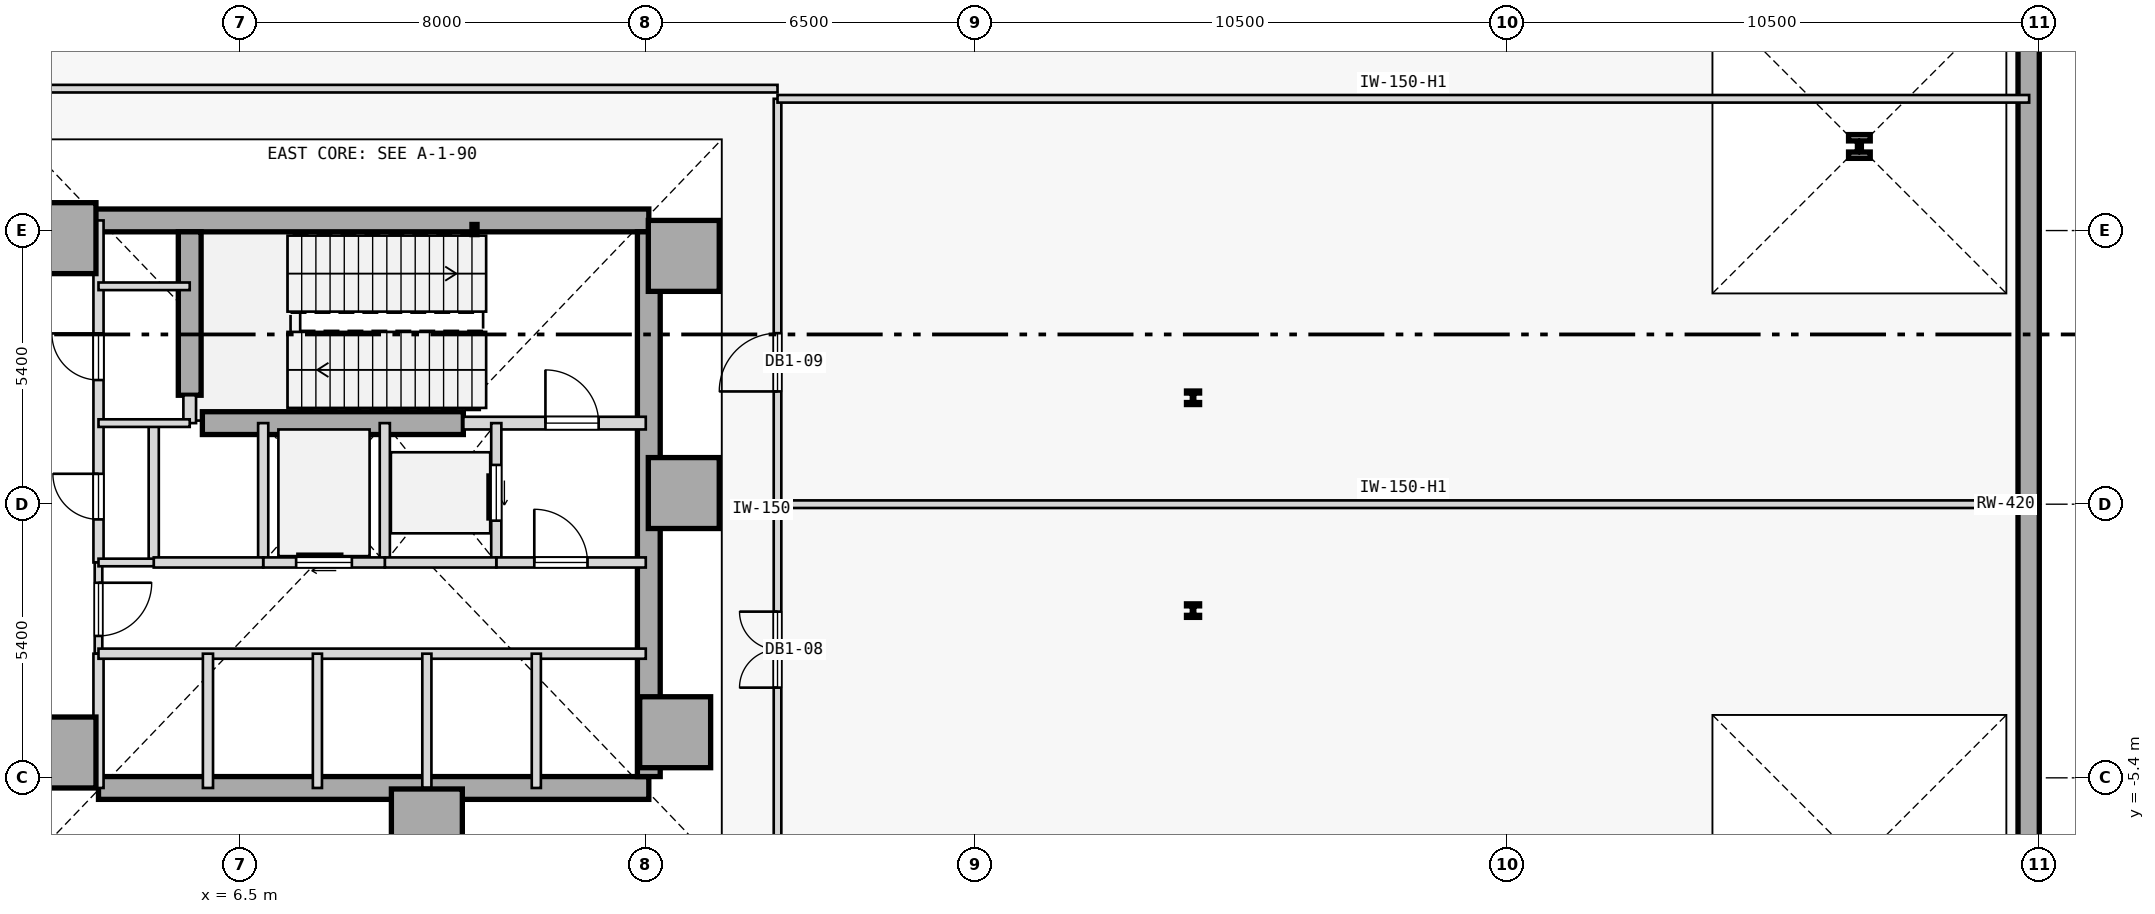
"""IFC4 building model, lengths in metres.
Left out: names, types, materials, properties, quantities, classifications, styles, units other than length and angle.
Written with IfcOpenShell. Run it as: python <this file> out.ifc"""

import sys

from ifc_helpers import new_model, si_unit, direction, frame, frame_2d, origin, origin_2d, place, context, subcontext, project, spatial, rectangle, hollow_rectangle, i_section, extrude, element, fill, save


model = new_model("IFC4")
c1 = context("Model", 3, precision=1e-05, world=origin(), true_north=direction((0.0, 1.0)))
c2 = subcontext(c1, "Body", "Model", "MODEL_VIEW")
j1 = project(units=[si_unit("LENGTHUNIT", "METRE"), si_unit("PLANEANGLEUNIT", "RADIAN")], contexts=[c1])
p1 = place(None, origin())
s1 = spatial("IfcSite", under=j1, at=p1, CompositionType="ELEMENT")
p2 = place(p1, origin())
s2 = spatial("IfcBuilding", under=s1, at=p2, CompositionType="ELEMENT")
p3 = place(p2, frame((0.0, 0.0, -5.0)))
s3 = spatial("IfcBuildingStorey", under=s2, at=p3, CompositionType="ELEMENT", Elevation=-5.0)
p4 = place(p3, frame((41.79, -27.55, 0.0), z_axis=(0.0, 0.0, 1.0), x_axis=(0.0, 1.0, 0.0)))
e1 = element("IfcWall", 1, at=p4, inside=s3, PredefinedType="SHEAR", context=c2, shape_type="SweptSolid", body=[
    extrude(rectangle(XDim=55.1, YDim=0.42, at=frame_2d((27.55, 0.0))), origin(), (0.0, 0.0, 1.0), 4.7),
])
for number, where, z_axis, x_axis in (
    (2, (15.25, 4.9, 0.0), (0.0, 0.0, 1.0), (1.0, 0.0, 0.0)),
    (3, (15.25, 0.22, 0.0), (0.0, 0.0, 1.0), (1.0, 0.0, 0.0)),
    (4, (15.08, -4.5, 0.0), (0.0, 0.0, 1.0), (1.0, 0.0, 0.0)),
    (5, (10.18, -6.32, 0.0), (0.0, 0.0, 1.0), (1.0, 0.0, 0.0)),
    (6, (2.95, -4.9, 0.0), (0.0, 0.0, 1.0), (1.0, 0.0, 0.0)),
    (7, (2.95, 5.25, 0.0), (0.0, 0.0, 1.0), (1.0, 0.0, 0.0)),
):
    element("IfcColumn", number, at=place(p3, frame(where, z_axis=z_axis, x_axis=x_axis)), inside=s3, PredefinedType="COLUMN", context=c2, shape_type="SweptSolid", body=[
        extrude(rectangle(XDim=1.4, YDim=1.4, at=origin_2d()), origin(), (0.0, 0.0, 1.0), 5.0),
    ])
p5 = place(p3, frame((3.15, 5.6, 0.0), z_axis=(0.0, 0.0, 1.0), x_axis=(1.0, 0.0, 0.0)))
e8 = element("IfcWall", 8, at=p5, inside=s3, PredefinedType="SHEAR", context=c2, shape_type="SweptSolid", body=[
    extrude(rectangle(XDim=11.41, YDim=0.45, at=frame_2d((5.705, 0.0))), origin(), (0.0, 0.0, 1.0), 4.7),
])
p6 = place(p3, frame((3.7, -5.6, 0.0), z_axis=(0.0, 0.0, 1.0), x_axis=(1.0, 0.0, 0.0)))
e9 = element("IfcWall", 9, at=p6, inside=s3, PredefinedType="SHEAR", context=c2, shape_type="SweptSolid", body=[
    extrude(rectangle(XDim=10.86, YDim=0.45, at=frame_2d((5.43, 0.0))), origin(), (0.0, 0.0, 1.0), 4.7),
])
p7 = place(p3, frame((14.56, -5.375, 0.0), z_axis=(0.0, 0.0, 1.0), x_axis=(0.0, 1.0, 0.0)))
e10 = element("IfcWall", 10, at=p7, inside=s3, PredefinedType="SHEAR", context=c2, shape_type="SweptSolid", body=[
    extrude(rectangle(XDim=10.75, YDim=0.45, at=frame_2d((5.375, 0.0))), origin(), (0.0, 0.0, 1.0), 4.7),
])
p8 = place(p3, frame((5.5, 2.15, 0.0), z_axis=(0.0, 0.0, 1.0), x_axis=(0.0, 1.0, 0.0)))
e11 = element("IfcWall", 11, at=p8, inside=s3, PredefinedType="SHEAR", context=c2, shape_type="SweptSolid", body=[
    extrude(rectangle(XDim=3.225, YDim=0.45, at=frame_2d((1.613, 0.0))), origin(), (0.0, 0.0, 1.0), 4.7),
])
p9 = place(p3, frame((5.75, 1.6, 0.0), z_axis=(0.0, 0.0, 1.0), x_axis=(1.0, 0.0, 0.0)))
e12 = element("IfcWall", 12, at=p9, inside=s3, PredefinedType="SHEAR", context=c2, shape_type="SweptSolid", body=[
    extrude(rectangle(XDim=5.15, YDim=0.45, at=frame_2d((2.575, 0.0))), origin(), (0.0, 0.0, 1.0), 4.7),
])
p10 = place(p3, frame((11.12, 5.42, 0.0), z_axis=(0.0, 0.0, 1.0), x_axis=(1.0, 0.0, 0.0)))
e13 = element("IfcColumn", 13, at=p10, inside=s3, PredefinedType="COLUMN", context=c2, shape_type="SweptSolid", body=[
    extrude(hollow_rectangle(XDim=0.1, YDim=0.2, WallThickness=0.008, at=origin_2d()), origin(), (0.0, 0.0, 1.0), 5.0),
])
p11 = place(p3, frame((38.45, 7.059, 0.0), z_axis=(0.0, 0.0, 1.0), x_axis=(1.0, 0.0, 0.0)))
e14 = element("IfcColumn", 14, at=p11, inside=s3, PredefinedType="USERDEFINED", context=c2, shape_type="SweptSolid", body=[
    extrude(i_section(OverallWidth=0.428, OverallDepth=0.469, WebThickness=0.078, FlangeThickness=0.125, FilletRadius=0.015, at=origin_2d()), origin(), (0.0, 0.0, 1.0), 5.0),
])
for number, where, z_axis, x_axis in (
    (15, (25.3, -2.1, 0.0), (0.0, 0.0, 1.0), (1.0, 0.0, 0.0)),
    (16, (25.3, 2.1, 0.0), (0.0, 0.0, 1.0), (1.0, 0.0, 0.0)),
):
    element("IfcColumn", number, at=place(p3, frame(where, z_axis=z_axis, x_axis=x_axis)), inside=s3, PredefinedType="COLUMN", context=c2, shape_type="SweptSolid", body=[
        extrude(i_section(OverallWidth=0.259, OverallDepth=0.267, WebThickness=0.013, FlangeThickness=0.021, FilletRadius=0.013, at=origin_2d()), origin(), (0.0, 0.0, 1.0), 5.0),
    ])
p12 = place(p3, frame((10.9, 1.6, 0.0), z_axis=(0.0, 0.0, 1.0), x_axis=(1.0, 0.0, 0.0)))
e17 = element("IfcWall", 17, at=p12, inside=s3, PredefinedType="STANDARD", context=c2, shape_type="SweptSolid", body=[
    extrude(rectangle(XDim=3.6, YDim=0.25, at=frame_2d((1.8, 0.0))), origin(), (0.0, 0.0, 1.0), 4.7),
])
p13 = place(p12, frame((1.62, 0.0, 0.0)))
e18 = element("IfcOpeningElement", 18, at=p13, cuts=e17, PredefinedType="OPENING", context=c2, shape_type="SweptSolid", body=[
    extrude(rectangle(XDim=1.05, YDim=2.15, at=frame_2d((0.525, 1.075))), frame((0.0, 0.135, 0.0), z_axis=(0.0, -1.0, 0.0), x_axis=(1.0, 0.0, 0.0)), (0.0, 0.0, 1.0), 0.27),
])
p14 = place(p3, frame((5.5, 1.6, 0.0), z_axis=(0.0, 0.0, 1.0), x_axis=(0.0, 1.0, 0.0)))
e19 = element("IfcWall", 19, at=p14, inside=s3, PredefinedType="STANDARD", context=c2, shape_type="SweptSolid", body=[
    extrude(rectangle(XDim=0.55, YDim=0.25, at=frame_2d((0.275, 0.0))), origin(), (0.0, 0.0, 1.0), 4.7),
])
p15 = place(p3, frame((3.7, -1.15, 0.0), z_axis=(0.0, 0.0, 1.0), x_axis=(0.0, 1.0, 0.0)))
e20 = element("IfcWall", 20, at=p15, inside=s3, PredefinedType="STANDARD", context=c2, shape_type="SweptSolid", body=[
    extrude(rectangle(XDim=6.75, YDim=0.2, at=frame_2d((3.375, 0.0))), origin(), (0.0, 0.0, 1.0), 4.7),
])
p16 = place(p15, frame((3.6, 0.0, 0.0)))
e21 = element("IfcOpeningElement", 21, at=p16, cuts=e20, PredefinedType="OPENING", context=c2, shape_type="SweptSolid", body=[
    extrude(rectangle(XDim=0.92, YDim=2.15, at=frame_2d((0.46, 1.075))), frame((0.0, 0.11, 0.0), z_axis=(0.0, -1.0, 0.0), x_axis=(1.0, 0.0, 0.0)), (0.0, 0.0, 1.0), 0.22),
])
p17 = place(p15, frame((0.85, 0.0, 0.0)))
e22 = element("IfcOpeningElement", 22, at=p17, cuts=e20, PredefinedType="OPENING", context=c2, shape_type="SweptSolid", body=[
    extrude(rectangle(XDim=0.9, YDim=2.15, at=frame_2d((0.45, 1.075))), frame((0.0, 0.11, 0.0), z_axis=(0.0, -1.0, 0.0), x_axis=(1.0, 0.0, 0.0)), (0.0, 0.0, 1.0), 0.22),
])
p18 = place(p3, frame((3.7, -2.95, 0.0), z_axis=(0.0, 0.0, 1.0), x_axis=(0.0, 1.0, 0.0)))
e23 = element("IfcWall", 23, at=p18, inside=s3, PredefinedType="PARTITIONING", context=c2, shape_type="SweptSolid", body=[
    extrude(rectangle(XDim=1.8, YDim=0.15, at=frame_2d((0.9, 0.0))), origin(), (0.0, 0.0, 1.0), 4.7),
])
p19 = place(p18, frame((0.35, 0.0, 0.0)))
e24 = element("IfcOpeningElement", 24, at=p19, cuts=e23, PredefinedType="OPENING", context=c2, shape_type="SweptSolid", body=[
    extrude(rectangle(XDim=1.05, YDim=2.18, at=frame_2d((0.525, 1.09))), frame((0.0, 0.085, 0.0), z_axis=(0.0, -1.0, 0.0), x_axis=(1.0, 0.0, 0.0)), (0.0, 0.0, 1.0), 0.17),
])
p20 = place(p3, frame((3.7, -5.6, 0.0), z_axis=(0.0, 0.0, 1.0), x_axis=(0.0, 1.0, 0.0)))
e25 = element("IfcWall", 25, at=p20, inside=s3, PredefinedType="STANDARD", context=c2, shape_type="SweptSolid", body=[
    extrude(rectangle(XDim=2.65, YDim=0.2, at=frame_2d((1.325, 0.0))), origin(), (0.0, 0.0, 1.0), 4.7),
])
p21 = place(p3, frame((11.55, -1.15, 0.0), z_axis=(0.0, 0.0, 1.0), x_axis=(0.0, 1.0, 0.0)))
e26 = element("IfcWall", 26, at=p21, inside=s3, PredefinedType="STANDARD", context=c2, shape_type="SweptSolid", body=[
    extrude(rectangle(XDim=2.75, YDim=0.2, at=frame_2d((1.375, 0.0))), origin(), (0.0, 0.0, 1.0), 4.7),
])
p22 = place(p21, frame((0.825, 0.0, 0.0)))
e27 = element("IfcOpeningElement", 27, at=p22, cuts=e26, PredefinedType="OPENING", context=c2, shape_type="SweptSolid", body=[
    extrude(rectangle(XDim=1.1, YDim=2.15, at=frame_2d((0.55, 1.075))), frame((0.0, 0.11, 0.0), z_axis=(0.0, -1.0, 0.0), x_axis=(1.0, 0.0, 0.0)), (0.0, 0.0, 1.0), 0.22),
])
p23 = place(p3, frame((9.35, -1.15, 0.0), z_axis=(0.0, 0.0, 1.0), x_axis=(0.0, 1.0, 0.0)))
e28 = element("IfcWall", 28, at=p23, inside=s3, PredefinedType="STANDARD", context=c2, shape_type="SweptSolid", body=[
    extrude(rectangle(XDim=2.75, YDim=0.2, at=frame_2d((1.375, 0.0))), origin(), (0.0, 0.0, 1.0), 4.7),
])
p24 = place(p3, frame((11.55, -1.15, 0.0), z_axis=(0.0, 0.0, 1.0), x_axis=(1.0, 0.0, 0.0)))
e29 = element("IfcWall", 29, at=p24, inside=s3, PredefinedType="STANDARD", context=c2, shape_type="SweptSolid", body=[
    extrude(rectangle(XDim=2.95, YDim=0.2, at=frame_2d((1.475, 0.0))), origin(), (0.0, 0.0, 1.0), 4.7),
])
p25 = place(p24, frame((0.75, 0.0, 0.0)))
e30 = element("IfcOpeningElement", 30, at=p25, cuts=e29, PredefinedType="OPENING", context=c2, shape_type="SweptSolid", body=[
    extrude(rectangle(XDim=1.05, YDim=2.18, at=frame_2d((0.525, 1.09))), frame((0.0, 0.11, 0.0), z_axis=(0.0, -1.0, 0.0), x_axis=(1.0, 0.0, 0.0)), (0.0, 0.0, 1.0), 0.22),
])
p26 = place(p3, frame((9.35, -1.15, 0.0), z_axis=(0.0, 0.0, 1.0), x_axis=(1.0, 0.0, 0.0)))
e31 = element("IfcWall", 31, at=p26, inside=s3, PredefinedType="STANDARD", context=c2, shape_type="SweptSolid", body=[
    extrude(rectangle(XDim=2.2, YDim=0.2, at=frame_2d((1.1, 0.0))), origin(), (0.0, 0.0, 1.0), 4.7),
])
p27 = place(p3, frame((6.95, -1.15, 0.0), z_axis=(0.0, 0.0, 1.0), x_axis=(0.0, 1.0, 0.0)))
e32 = element("IfcWall", 32, at=p27, inside=s3, PredefinedType="STANDARD", context=c2, shape_type="SweptSolid", body=[
    extrude(rectangle(XDim=2.75, YDim=0.2, at=frame_2d((1.375, 0.0))), origin(), (0.0, 0.0, 1.0), 4.7),
])
p28 = place(p3, frame((6.95, -1.15, 0.0), z_axis=(0.0, 0.0, 1.0), x_axis=(1.0, 0.0, 0.0)))
e33 = element("IfcWall", 33, at=p28, inside=s3, PredefinedType="STANDARD", context=c2, shape_type="SweptSolid", body=[
    extrude(rectangle(XDim=2.4, YDim=0.2, at=frame_2d((1.2, 0.0))), origin(), (0.0, 0.0, 1.0), 4.7),
])
p29 = place(p28, frame((0.65, 0.0, 0.0)))
e34 = element("IfcOpeningElement", 34, at=p29, cuts=e33, PredefinedType="OPENING", context=c2, shape_type="SweptSolid", body=[
    extrude(rectangle(XDim=1.1, YDim=2.15, at=frame_2d((0.55, 1.075))), frame((0.0, 0.11, 0.0), z_axis=(0.0, -1.0, 0.0), x_axis=(1.0, 0.0, 0.0)), (0.0, 0.0, 1.0), 0.22),
])
p30 = place(p3, frame((4.79, -1.15, 0.0), z_axis=(0.0, 0.0, 1.0), x_axis=(0.0, 1.0, 0.0)))
e35 = element("IfcWall", 35, at=p30, inside=s3, PredefinedType="STANDARD", context=c2, shape_type="SweptSolid", body=[
    extrude(rectangle(XDim=2.75, YDim=0.2, at=frame_2d((1.375, 0.0))), origin(), (0.0, 0.0, 1.0), 4.7),
])
p31 = place(p3, frame((4.79, -1.15, 0.0), z_axis=(0.0, 0.0, 1.0), x_axis=(1.0, 0.0, 0.0)))
e36 = element("IfcWall", 36, at=p31, inside=s3, PredefinedType="STANDARD", context=c2, shape_type="SweptSolid", body=[
    extrude(rectangle(XDim=2.16, YDim=0.2, at=frame_2d((1.08, 0.0))), origin(), (0.0, 0.0, 1.0), 4.7),
])
p32 = place(p3, frame((3.7, -1.15, 0.0), z_axis=(0.0, 0.0, 1.0), x_axis=(1.0, 0.0, 0.0)))
e37 = element("IfcWall", 37, at=p32, inside=s3, PredefinedType="PARTITIONING", context=c2, shape_type="SweptSolid", body=[
    extrude(rectangle(XDim=1.09, YDim=0.15, at=frame_2d((0.545, 0.0))), origin(), (0.0, 0.0, 1.0), 4.7),
])
p33 = place(p3, frame((3.7, -2.95, 0.0), z_axis=(0.0, 0.0, 1.0), x_axis=(1.0, 0.0, 0.0)))
e38 = element("IfcWall", 38, at=p33, inside=s3, PredefinedType="STANDARD", context=c2, shape_type="SweptSolid", body=[
    extrude(rectangle(XDim=10.8, YDim=0.2, at=frame_2d((5.4, 0.0))), origin(), (0.0, 0.0, 1.0), 4.7),
])
p34 = place(p3, frame((5.86, -5.6, 0.0), z_axis=(0.0, 0.0, 1.0), x_axis=(0.0, 1.0, 0.0)))
e39 = element("IfcWall", 39, at=p34, inside=s3, PredefinedType="STANDARD", context=c2, shape_type="SweptSolid", body=[
    extrude(rectangle(XDim=2.65, YDim=0.2, at=frame_2d((1.325, 0.0))), origin(), (0.0, 0.0, 1.0), 4.7),
])
for number, where, z_axis, x_axis in (
    (40, (12.34, -5.6, 0.0), (0.0, 0.0, 1.0), (0.0, 1.0, 0.0)),
    (41, (10.18, -5.6, 0.0), (0.0, 0.0, 1.0), (0.0, 1.0, 0.0)),
    (42, (8.02, -5.6, 0.0), (0.0, 0.0, 1.0), (0.0, 1.0, 0.0)),
):
    element("IfcWall", number, at=place(p3, frame(where, z_axis=z_axis, x_axis=x_axis)), inside=s3, PredefinedType="STANDARD", context=c2, shape_type="SweptSolid", body=[
        extrude(rectangle(XDim=2.65, YDim=0.18, at=frame_2d((1.325, 0.0))), origin(), (0.0, 0.0, 1.0), 4.7),
    ])
for number, where, z_axis, x_axis in (
    (43, (3.7, 4.3, 0.0), (0.0, 0.0, 1.0), (1.0, 0.0, 0.0)),
    (44, (3.7, 1.6, 0.0), (0.0, 0.0, 1.0), (1.0, 0.0, 0.0)),
):
    element("IfcWall", number, at=place(p3, frame(where, z_axis=z_axis, x_axis=x_axis)), inside=s3, PredefinedType="PARTITIONING", context=c2, shape_type="SweptSolid", body=[
        extrude(rectangle(XDim=1.8, YDim=0.15, at=frame_2d((0.9, 0.0))), origin(), (0.0, 0.0, 1.0), 4.7),
    ])
p35 = place(p3, frame((-17.1, 8.2, 0.0), z_axis=(0.0, 0.0, 1.0), x_axis=(1.0, 0.0, 0.0)))
e45 = element("IfcWall", 45, at=p35, inside=s3, PredefinedType="PARTITIONING", context=c2, shape_type="SweptSolid", body=[
    extrude(rectangle(XDim=34.2, YDim=0.15, at=frame_2d((17.1, 0.0))), origin(), (0.0, 0.0, 1.0), 4.7),
])
p36 = place(p35, frame((16.3, 0.0, 0.0)))
e46 = element("IfcOpeningElement", 46, at=p36, cuts=e45, PredefinedType="OPENING", context=c2, shape_type="SweptSolid", body=[
    extrude(rectangle(XDim=1.6, YDim=2.15, at=frame_2d((0.8, 1.075))), frame((0.0, 0.085, 0.0), z_axis=(0.0, -1.0, 0.0), x_axis=(1.0, 0.0, 0.0)), (0.0, 0.0, 1.0), 0.17),
])
p37 = place(p3, frame((17.1, -8.2, 0.0), z_axis=(0.0, 0.0, 1.0), x_axis=(0.0, 1.0, 0.0)))
e47 = element("IfcWall", 47, at=p37, inside=s3, PredefinedType="PARTITIONING", context=c2, shape_type="SweptSolid", body=[
    extrude(rectangle(XDim=8.2, YDim=0.15, at=frame_2d((4.1, 0.0))), origin(), (0.0, 0.0, 1.0), 4.7),
])
p38 = place(p37, frame((4.58, 0.0, 0.0)))
e48 = element("IfcOpeningElement", 48, at=p38, cuts=e47, PredefinedType="OPENING", context=c2, shape_type="SweptSolid", body=[
    extrude(rectangle(XDim=1.5, YDim=2.15, at=frame_2d((0.75, 1.075))), frame((0.0, 0.085, 0.0), z_axis=(0.0, -1.0, 0.0), x_axis=(1.0, 0.0, 0.0)), (0.0, 0.0, 1.0), 0.17),
])
p39 = place(p3, frame((17.1, 0.0, 0.0), z_axis=(0.0, 0.0, 1.0), x_axis=(0.0, 1.0, 0.0)))
e49 = element("IfcWall", 49, at=p39, inside=s3, PredefinedType="PARTITIONING", context=c2, shape_type="SweptSolid", body=[
    extrude(rectangle(XDim=8.0, YDim=0.15, at=frame_2d((4.0, 0.0))), origin(), (0.0, 0.0, 1.0), 4.7),
])
p40 = place(p39, frame((2.225, 0.0, 0.0)))
e50 = element("IfcOpeningElement", 50, at=p40, cuts=e49, PredefinedType="OPENING", context=c2, shape_type="SweptSolid", body=[
    extrude(rectangle(XDim=1.15, YDim=2.15, at=frame_2d((0.575, 1.075))), frame((0.0, 0.085, 0.0), z_axis=(0.0, -1.0, 0.0), x_axis=(1.0, 0.0, 0.0)), (0.0, 0.0, 1.0), 0.17),
])
for number, where, z_axis, x_axis in (
    (51, (17.1, 8.0, 0.0), (0.0, 0.0, 1.0), (1.0, 0.0, 0.0)),
    (52, (17.1, 0.0, 0.0), (0.0, 0.0, 1.0), (1.0, 0.0, 0.0)),
):
    element("IfcWall", number, at=place(p3, frame(where, z_axis=z_axis, x_axis=x_axis)), inside=s3, PredefinedType="PARTITIONING", context=c2, shape_type="SweptSolid", body=[
        extrude(rectangle(XDim=24.7, YDim=0.15, at=frame_2d((12.35, 0.0))), origin(), (0.0, 0.0, 1.0), 4.25),
    ])
p41 = place(p13, origin())
e53 = element("IfcDoor", 53, at=p41, inside=s3, OperationType="SINGLE_SWING_LEFT", PredefinedType="DOOR", context=c2, shape_type="SweptSolid", body=[
    extrude(rectangle(XDim=1.05, YDim=2.15, at=frame_2d((0.525, 1.075))), frame((0.0, 0.025, 0.0), z_axis=(0.0, -1.0, 0.0), x_axis=(1.0, 0.0, 0.0)), (0.0, 0.0, 1.0), 0.05),
])
fill(e18, e53)
p42 = place(p25, origin())
e54 = element("IfcDoor", 54, at=p42, inside=s3, OperationType="SINGLE_SWING_LEFT", PredefinedType="DOOR", context=c2, shape_type="SweptSolid", body=[
    extrude(rectangle(XDim=1.05, YDim=2.18, at=frame_2d((0.525, 1.09))), frame((0.0, 0.025, 0.0), z_axis=(0.0, -1.0, 0.0), x_axis=(1.0, 0.0, 0.0)), (0.0, 0.0, 1.0), 0.05),
])
fill(e30, e54)
p43 = place(p19, frame((1.05, 0.0, 0.0), z_axis=(0.0, 0.0, 1.0), x_axis=(-1.0, 0.0, 0.0)))
e55 = element("IfcDoor", 55, at=p43, inside=s3, OperationType="SINGLE_SWING_RIGHT", PredefinedType="DOOR", context=c2, shape_type="SweptSolid", body=[
    extrude(rectangle(XDim=1.05, YDim=2.18, at=frame_2d((0.525, 1.09))), frame((0.0, 0.025, 0.0), z_axis=(0.0, -1.0, 0.0), x_axis=(1.0, 0.0, 0.0)), (0.0, 0.0, 1.0), 0.05),
])
fill(e24, e55)
p44 = place(p22, origin())
e56 = element("IfcDoor", 56, at=p44, inside=s3, OperationType="SLIDING_TO_RIGHT", PredefinedType="DOOR", context=c2, shape_type="SweptSolid", body=[
    extrude(rectangle(XDim=1.1, YDim=2.15, at=frame_2d((0.55, 1.075))), frame((0.0, 0.025, 0.0), z_axis=(0.0, -1.0, 0.0), x_axis=(1.0, 0.0, 0.0)), (0.0, 0.0, 1.0), 0.05),
])
fill(e27, e56)
p45 = place(p29, origin())
e57 = element("IfcDoor", 57, at=p45, inside=s3, OperationType="SLIDING_TO_RIGHT", PredefinedType="DOOR", context=c2, shape_type="SweptSolid", body=[
    extrude(rectangle(XDim=1.1, YDim=2.15, at=frame_2d((0.55, 1.075))), frame((0.0, 0.025, 0.0), z_axis=(0.0, -1.0, 0.0), x_axis=(1.0, 0.0, 0.0)), (0.0, 0.0, 1.0), 0.05),
])
fill(e34, e57)
p46 = place(p16, origin())
e58 = element("IfcDoor", 58, at=p46, inside=s3, OperationType="SINGLE_SWING_RIGHT", PredefinedType="DOOR", context=c2, shape_type="SweptSolid", body=[
    extrude(rectangle(XDim=0.92, YDim=2.15, at=frame_2d((0.46, 1.075))), frame((0.0, 0.025, 0.0), z_axis=(0.0, -1.0, 0.0), x_axis=(1.0, 0.0, 0.0)), (0.0, 0.0, 1.0), 0.05),
])
fill(e21, e58)
p47 = place(p17, origin())
e59 = element("IfcDoor", 59, at=p47, inside=s3, OperationType="SINGLE_SWING_RIGHT", PredefinedType="DOOR", context=c2, shape_type="SweptSolid", body=[
    extrude(rectangle(XDim=0.9, YDim=2.15, at=frame_2d((0.45, 1.075))), frame((0.0, 0.025, 0.0), z_axis=(0.0, -1.0, 0.0), x_axis=(1.0, 0.0, 0.0)), (0.0, 0.0, 1.0), 0.05),
])
fill(e22, e59)
p48 = place(p38, origin())
e60 = element("IfcDoor", 60, at=p48, inside=s3, OperationType="DOUBLE_DOOR_SINGLE_SWING", PredefinedType="DOOR", context=c2, shape_type="SweptSolid", body=[
    extrude(rectangle(XDim=1.5, YDim=2.15, at=frame_2d((0.75, 1.075))), frame((0.0, 0.025, 0.0), z_axis=(0.0, -1.0, 0.0), x_axis=(1.0, 0.0, 0.0)), (0.0, 0.0, 1.0), 0.05),
])
fill(e48, e60)
p49 = place(p40, origin())
e61 = element("IfcDoor", 61, at=p49, inside=s3, OperationType="SINGLE_SWING_LEFT", PredefinedType="DOOR", context=c2, shape_type="SweptSolid", body=[
    extrude(rectangle(XDim=1.15, YDim=2.15, at=frame_2d((0.575, 1.075))), frame((0.0, 0.025, 0.0), z_axis=(0.0, -1.0, 0.0), x_axis=(1.0, 0.0, 0.0)), (0.0, 0.0, 1.0), 0.05),
])
fill(e50, e61)
save(model, sys.argv[1])
